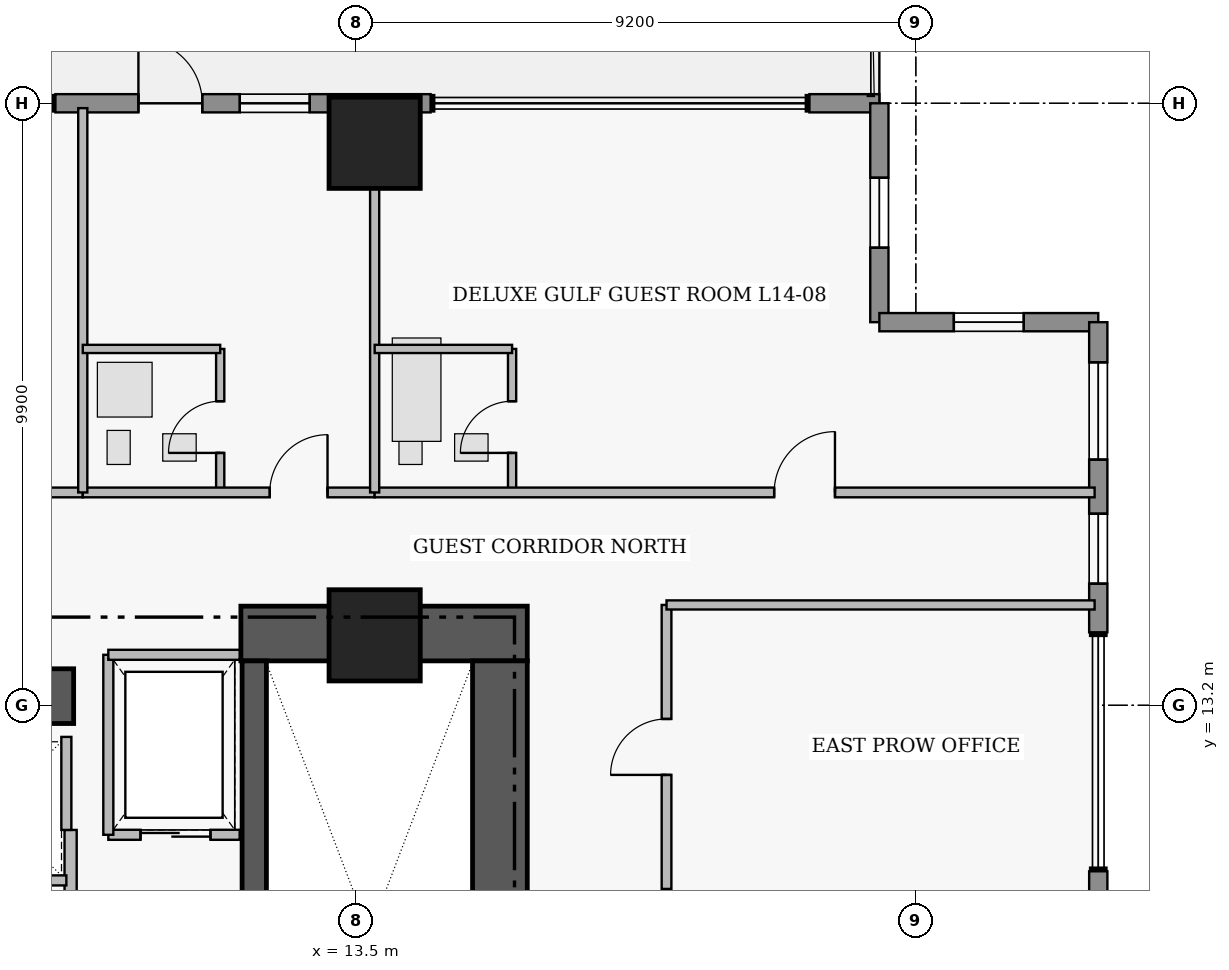
"""IFC4 building model, lengths in metres.
Left out: names, types, materials, properties, quantities, classifications, styles, units other than length and angle.
Written with IfcOpenShell. Run it as: python <this file> out.ifc"""

import sys

from ifc_helpers import new_model, si_unit, direction, frame, frame_2d, origin, origin_2d, place, context, subcontext, project, spatial, rectangle, extrude, element, fill, save


model = new_model("IFC4")
c1 = context("Model", 3, precision=1e-05, world=origin(), true_north=direction((0.0, 1.0)))
c2 = subcontext(c1, "Body", "Model", "MODEL_VIEW")
j1 = project(units=[si_unit("LENGTHUNIT", "METRE"), si_unit("PLANEANGLEUNIT", "RADIAN")], contexts=[c1])
p1 = place(None, origin())
s1 = spatial("IfcSite", under=j1, at=p1, CompositionType="ELEMENT")
p2 = place(p1, origin())
s2 = spatial("IfcBuilding", under=s1, at=p2, CompositionType="ELEMENT")
p3 = place(p2, frame((0.0, 0.0, 60.45)))
s3 = spatial("IfcBuildingStorey", under=s2, at=p3, CompositionType="ELEMENT", Elevation=60.45)
p4 = place(p3, frame((11.6, 14.38, 0.0), z_axis=(0.0, 0.0, 1.0), x_axis=(1.0, 0.0, 0.0)))
e1 = element("IfcWall", 1, at=p4, inside=s3, PredefinedType="SHEAR", context=c2, shape_type="SweptSolid", body=[
    extrude(rectangle(XDim=4.71, YDim=0.9, at=frame_2d((2.355, 0.0))), origin(), (0.0, 0.0, 1.0), 3.46),
])
p5 = place(p3, frame((15.86, 4.97, 0.0), z_axis=(0.0, 0.0, 1.0), x_axis=(0.0, 1.0, 0.0)))
e2 = element("IfcWall", 2, at=p5, inside=s3, PredefinedType="SHEAR", context=c2, shape_type="SweptSolid", body=[
    extrude(rectangle(XDim=8.96, YDim=0.9, at=frame_2d((4.48, 0.0))), origin(), (0.0, 0.0, 1.0), 3.46),
])
p6 = place(p3, frame((1.25, 13.35, 0.0), z_axis=(0.0, 0.0, 1.0), x_axis=(1.0, 0.0, 0.0)))
e3 = element("IfcWall", 3, at=p6, inside=s3, PredefinedType="SHEAR", context=c2, shape_type="SweptSolid", body=[
    extrude(rectangle(XDim=7.6, YDim=0.9, at=frame_2d((3.8, 0.0))), origin(), (0.0, 0.0, 1.0), 3.43),
])
p7 = place(p3, frame((11.82, 13.93, 0.0), z_axis=(0.0, 0.0, 1.0), x_axis=(0.0, -1.0, 0.0)))
e4 = element("IfcWall", 4, at=p7, inside=s3, PredefinedType="SHEAR", context=c2, shape_type="SweptSolid", body=[
    extrude(rectangle(XDim=8.96, YDim=0.4, at=frame_2d((4.48, 0.0))), origin(), (0.0, 0.0, 1.0), 3.46),
])
p8 = place(p7, frame((7.53, 0.0, 0.0)))
e5 = element("IfcOpeningElement", 5, at=p8, cuts=e4, PredefinedType="OPENING", context=c2, shape_type="SweptSolid", body=[
    extrude(rectangle(XDim=1.12, YDim=2.22, at=frame_2d((0.56, 1.11))), frame((0.0, 0.21, 0.0), z_axis=(0.0, -1.0, 0.0), x_axis=(1.0, 0.0, 0.0)), (0.0, 0.0, 1.0), 0.42),
])
for number, where, z_axis, x_axis in (
    (6, (13.8, 14.35, 0.0), (0.0, 0.0, 1.0), (1.0, 0.0, 0.0)),
    (7, (13.8, 22.45, 0.0), (0.0, 0.0, 1.0), (1.0, 0.0, 0.0)),
):
    element("IfcColumn", number, at=place(p3, frame(where, z_axis=z_axis, x_axis=x_axis)), inside=s3, PredefinedType="COLUMN", context=c2, shape_type="SweptSolid", body=[
        extrude(rectangle(XDim=1.5, YDim=1.5, at=origin_2d()), origin(), (0.0, 0.0, 1.0), 3.65),
    ])
p9 = place(p3, frame((8.55, 23.1, 0.0), z_axis=(0.0, 0.0, 1.0), x_axis=(1.0, 0.0, 0.0)))
e8 = element("IfcWall", 8, at=p9, inside=s3, PredefinedType="STANDARD", context=c2, shape_type="SweptSolid", body=[
    extrude(rectangle(XDim=6.17, YDim=0.3, at=frame_2d((3.085, 0.0))), origin(), (0.0, 0.0, 1.0), 3.43),
])
p10 = place(p9, frame((1.365, 0.0, 0.0)))
e9 = element("IfcOpeningElement", 9, at=p10, cuts=e8, PredefinedType="OPENING", context=c2, shape_type="SweptSolid", body=[
    extrude(rectangle(XDim=1.05, YDim=2.2, at=frame_2d((0.525, 1.1))), frame((0.0, 0.16, 0.0), z_axis=(0.0, -1.0, 0.0), x_axis=(1.0, 0.0, 0.0)), (0.0, 0.0, 1.0), 0.32),
])
p11 = place(p9, frame((3.032, 0.0, 0.95)))
e10 = element("IfcOpeningElement", 10, at=p11, cuts=e8, PredefinedType="OPENING", context=c2, shape_type="SweptSolid", body=[
    extrude(rectangle(XDim=1.15, YDim=1.55, at=frame_2d((0.575, 0.775))), frame((0.0, 0.16, 0.0), z_axis=(0.0, -1.0, 0.0), x_axis=(1.0, 0.0, 0.0)), (0.0, 0.0, 1.0), 0.32),
])
p12 = place(p3, frame((20.95, 23.1, 0.0), z_axis=(0.0, 0.0, 1.0), x_axis=(1.0, 0.0, 0.0)))
e11 = element("IfcWall", 11, at=p12, inside=s3, PredefinedType="STANDARD", context=c2, shape_type="SweptSolid", body=[
    extrude(rectangle(XDim=1.15, YDim=0.3, at=frame_2d((0.575, 0.0))), origin(), (0.0, 0.0, 1.0), 3.43),
])
p13 = place(p3, frame((22.1, 23.1, 0.0), z_axis=(0.0, 0.0, 1.0), x_axis=(0.0, -1.0, 0.0)))
e12 = element("IfcWall", 12, at=p13, inside=s3, PredefinedType="STANDARD", context=c2, shape_type="SweptSolid", body=[
    extrude(rectangle(XDim=3.6, YDim=0.3, at=frame_2d((1.8, 0.0))), origin(), (0.0, 0.0, 1.0), 3.43),
])
p14 = place(p13, frame((1.225, 0.0, 1.25)))
e13 = element("IfcOpeningElement", 13, at=p14, cuts=e12, PredefinedType="OPENING", context=c2, shape_type="SweptSolid", body=[
    extrude(rectangle(XDim=1.15, YDim=1.55, at=frame_2d((0.575, 0.775))), frame((0.0, 0.16, 0.0), z_axis=(0.0, -1.0, 0.0), x_axis=(1.0, 0.0, 0.0)), (0.0, 0.0, 1.0), 0.32),
])
p15 = place(p3, frame((22.1, 19.5, 0.0), z_axis=(0.0, 0.0, 1.0), x_axis=(1.0, 0.0, 0.0)))
e14 = element("IfcWall", 14, at=p15, inside=s3, PredefinedType="STANDARD", context=c2, shape_type="SweptSolid", body=[
    extrude(rectangle(XDim=3.6, YDim=0.3, at=frame_2d((1.8, 0.0))), origin(), (0.0, 0.0, 1.0), 3.43),
])
p16 = place(p15, frame((1.225, 0.0, 1.25)))
e15 = element("IfcOpeningElement", 15, at=p16, cuts=e14, PredefinedType="OPENING", context=c2, shape_type="SweptSolid", body=[
    extrude(rectangle(XDim=1.15, YDim=1.55, at=frame_2d((0.575, 0.775))), frame((0.0, 0.16, 0.0), z_axis=(0.0, -1.0, 0.0), x_axis=(1.0, 0.0, 0.0)), (0.0, 0.0, 1.0), 0.32),
])
p17 = place(p3, frame((25.7, 19.5, 0.0), z_axis=(0.0, 0.0, 1.0), x_axis=(0.0, -1.0, 0.0)))
e16 = element("IfcWall", 16, at=p17, inside=s3, PredefinedType="STANDARD", context=c2, shape_type="SweptSolid", body=[
    extrude(rectangle(XDim=5.1, YDim=0.3, at=frame_2d((2.55, 0.0))), origin(), (0.0, 0.0, 1.0), 3.43),
])
p18 = place(p17, frame((0.66, 0.0, 0.85)))
e17 = element("IfcOpeningElement", 17, at=p18, cuts=e16, PredefinedType="OPENING", context=c2, shape_type="SweptSolid", body=[
    extrude(rectangle(XDim=1.6, YDim=1.8, at=frame_2d((0.8, 0.9))), frame((0.0, 0.16, 0.0), z_axis=(0.0, -1.0, 0.0), x_axis=(1.0, 0.0, 0.0)), (0.0, 0.0, 1.0), 0.32),
])
p19 = place(p17, frame((3.15, 0.0, 0.95)))
e18 = element("IfcOpeningElement", 18, at=p19, cuts=e16, PredefinedType="OPENING", context=c2, shape_type="SweptSolid", body=[
    extrude(rectangle(XDim=1.15, YDim=1.55, at=frame_2d((0.575, 0.775))), frame((0.0, 0.16, 0.0), z_axis=(0.0, -1.0, 0.0), x_axis=(1.0, 0.0, 0.0)), (0.0, 0.0, 1.0), 0.32),
])
p20 = place(p3, frame((25.7, 10.47, 0.0), z_axis=(0.0, 0.0, 1.0), x_axis=(0.0, -1.0, 0.0)))
e19 = element("IfcWall", 19, at=p20, inside=s3, PredefinedType="STANDARD", context=c2, shape_type="SweptSolid", body=[
    extrude(rectangle(XDim=0.9, YDim=0.3, at=frame_2d((0.45, 0.0))), origin(), (0.0, 0.0, 1.0), 3.43),
])
p21 = place(p3, frame((8.8, 11.15, 0.0), z_axis=(0.0, 0.0, 1.0), x_axis=(0.0, -1.0, 0.0)))
e20 = element("IfcWall", 20, at=p21, inside=s3, PredefinedType="PARTITIONING", context=c2, shape_type="SweptSolid", body=[
    extrude(rectangle(XDim=6.1, YDim=0.2, at=frame_2d((3.05, 0.0))), origin(), (0.0, 0.0, 1.0), 3.43),
])
p22 = place(p21, frame((1.15, 0.0, 0.0)))
e21 = element("IfcOpeningElement", 21, at=p22, cuts=e20, PredefinedType="OPENING", context=c2, shape_type="SweptSolid", body=[
    extrude(rectangle(XDim=1.1, YDim=2.2, at=frame_2d((0.55, 1.1))), frame((0.0, 0.11, 0.0), z_axis=(0.0, -1.0, 0.0), x_axis=(1.0, 0.0, 0.0)), (0.0, 0.0, 1.0), 0.22),
])
p23 = place(p21, frame((4.75, 0.0, 0.0)))
e22 = element("IfcOpeningElement", 22, at=p23, cuts=e20, PredefinedType="OPENING", context=c2, shape_type="SweptSolid", body=[
    extrude(rectangle(XDim=1.1, YDim=2.2, at=frame_2d((0.55, 1.1))), frame((0.0, 0.11, 0.0), z_axis=(0.0, -1.0, 0.0), x_axis=(1.0, 0.0, 0.0)), (0.0, 0.0, 1.0), 0.22),
])
p24 = place(p3, frame((9.42, 11.07, 0.0), z_axis=(0.0, 0.0, 1.0), x_axis=(1.0, 0.0, 0.0)))
e23 = element("IfcWall", 23, at=p24, inside=s3, PredefinedType="PARTITIONING", context=c2, shape_type="SweptSolid", body=[
    extrude(rectangle(XDim=2.16, YDim=0.165, at=frame_2d((1.08, 0.0))), origin(), (0.0, 0.0, 1.0), 3.43),
])
p25 = place(p24, frame((0.53, 0.0, 0.0)))
e24 = element("IfcOpeningElement", 24, at=p25, cuts=e23, PredefinedType="OPENING", context=c2, shape_type="SweptSolid", body=[
    extrude(rectangle(XDim=1.15, YDim=2.25, at=frame_2d((0.575, 1.125))), frame((0.0, 0.093, 0.0), z_axis=(0.0, -1.0, 0.0), x_axis=(1.0, 0.0, 0.0)), (0.0, 0.0, 1.0), 0.185),
])
p26 = place(p3, frame((4.6, 16.7, 0.0), z_axis=(0.0, 0.0, 1.0), x_axis=(1.0, 0.0, 0.0)))
e25 = element("IfcWall", 25, at=p26, inside=s3, PredefinedType="PARTITIONING", context=c2, shape_type="SweptSolid", body=[
    extrude(rectangle(XDim=4.4, YDim=0.16, at=frame_2d((2.2, 0.0))), origin(), (0.0, 0.0, 1.0), 2.973),
])
p27 = place(p26, frame((2.875, 0.0, 0.0)))
e26 = element("IfcOpeningElement", 26, at=p27, cuts=e25, PredefinedType="OPENING", context=c2, shape_type="SweptSolid", body=[
    extrude(rectangle(XDim=0.95, YDim=2.15, at=frame_2d((0.475, 1.075))), frame((0.0, 0.09, 0.0), z_axis=(0.0, -1.0, 0.0), x_axis=(1.0, 0.0, 0.0)), (0.0, 0.0, 1.0), 0.18),
])
p28 = place(p3, frame((11.26, 16.7, 0.0), z_axis=(0.0, 0.0, 1.0), x_axis=(0.0, 1.0, 0.0)))
e27 = element("IfcWall", 27, at=p28, inside=s3, PredefinedType="PLUMBINGWALL", context=c2, shape_type="SweptSolid", body=[
    extrude(rectangle(XDim=2.36, YDim=0.135, at=frame_2d((1.18, 0.0))), origin(), (0.0, 0.0, 1.0), 3.43),
])
p29 = place(p28, frame((0.65, 0.0, 0.0)))
e28 = element("IfcOpeningElement", 28, at=p29, cuts=e27, PredefinedType="OPENING", context=c2, shape_type="SweptSolid", body=[
    extrude(rectangle(XDim=0.85, YDim=2.1, at=frame_2d((0.425, 1.05))), frame((0.0, 0.077, 0.0), z_axis=(0.0, -1.0, 0.0), x_axis=(1.0, 0.0, 0.0)), (0.0, 0.0, 1.0), 0.155),
])
p30 = place(p3, frame((9.0, 16.7, 0.0), z_axis=(0.0, 0.0, 1.0), x_axis=(1.0, 0.0, 0.0)))
e29 = element("IfcWall", 29, at=p30, inside=s3, PredefinedType="PARTITIONING", context=c2, shape_type="SweptSolid", body=[
    extrude(rectangle(XDim=4.8, YDim=0.16, at=frame_2d((2.4, 0.0))), origin(), (0.0, 0.0, 1.0), 2.973),
])
p31 = place(p30, frame((3.075, 0.0, 0.0)))
e30 = element("IfcOpeningElement", 30, at=p31, cuts=e29, PredefinedType="OPENING", context=c2, shape_type="SweptSolid", body=[
    extrude(rectangle(XDim=0.95, YDim=2.15, at=frame_2d((0.475, 1.075))), frame((0.0, 0.09, 0.0), z_axis=(0.0, -1.0, 0.0), x_axis=(1.0, 0.0, 0.0)), (0.0, 0.0, 1.0), 0.18),
])
p32 = place(p3, frame((16.06, 16.7, 0.0), z_axis=(0.0, 0.0, 1.0), x_axis=(0.0, 1.0, 0.0)))
e31 = element("IfcWall", 31, at=p32, inside=s3, PredefinedType="PLUMBINGWALL", context=c2, shape_type="SweptSolid", body=[
    extrude(rectangle(XDim=2.36, YDim=0.135, at=frame_2d((1.18, 0.0))), origin(), (0.0, 0.0, 1.0), 3.43),
])
p33 = place(p32, frame((0.65, 0.0, 0.0)))
e32 = element("IfcOpeningElement", 32, at=p33, cuts=e31, PredefinedType="OPENING", context=c2, shape_type="SweptSolid", body=[
    extrude(rectangle(XDim=0.85, YDim=2.1, at=frame_2d((0.425, 1.05))), frame((0.0, 0.077, 0.0), z_axis=(0.0, -1.0, 0.0), x_axis=(1.0, 0.0, 0.0)), (0.0, 0.0, 1.0), 0.155),
])
p34 = place(p3, frame((13.8, 16.7, 0.0), z_axis=(0.0, 0.0, 1.0), x_axis=(1.0, 0.0, 0.0)))
e33 = element("IfcWall", 33, at=p34, inside=s3, PredefinedType="PARTITIONING", context=c2, shape_type="SweptSolid", body=[
    extrude(rectangle(XDim=11.84, YDim=0.16, at=frame_2d((5.92, 0.0))), origin(), (0.0, 0.0, 1.0), 3.43),
])
p35 = place(p34, frame((6.57, 0.0, 0.0)))
e34 = element("IfcOpeningElement", 34, at=p35, cuts=e33, PredefinedType="OPENING", context=c2, shape_type="SweptSolid", body=[
    extrude(rectangle(XDim=1.0, YDim=2.15, at=frame_2d((0.5, 1.075))), frame((0.0, 0.09, 0.0), z_axis=(0.0, -1.0, 0.0), x_axis=(1.0, 0.0, 0.0)), (0.0, 0.0, 1.0), 0.18),
])
p36 = place(p3, frame((18.6, 10.18, 0.0), z_axis=(0.0, 0.0, 1.0), x_axis=(0.0, 1.0, 0.0)))
e35 = element("IfcWall", 35, at=p36, inside=s3, PredefinedType="PARTITIONING", context=c2, shape_type="SweptSolid", body=[
    extrude(rectangle(XDim=4.67, YDim=0.16, at=frame_2d((2.335, 0.0))), origin(), (0.0, 0.0, 1.0), 3.43),
])
p37 = place(p36, frame((1.875, 0.0, 0.0)))
e36 = element("IfcOpeningElement", 36, at=p37, cuts=e35, PredefinedType="OPENING", context=c2, shape_type="SweptSolid", body=[
    extrude(rectangle(XDim=0.92, YDim=2.12, at=frame_2d((0.46, 1.06))), frame((0.0, 0.09, 0.0), z_axis=(0.0, -1.0, 0.0), x_axis=(1.0, 0.0, 0.0)), (0.0, 0.0, 1.0), 0.18),
])
p38 = place(p3, frame((9.42, 11.07, 0.0), z_axis=(0.0, 0.0, 1.0), x_axis=(0.0, 1.0, 0.0)))
e37 = element("IfcWall", 37, at=p38, inside=s3, PredefinedType="PARTITIONING", context=c2, shape_type="SweptSolid", body=[
    extrude(rectangle(XDim=2.96, YDim=0.165, at=frame_2d((1.48, 0.0))), origin(), (0.0, 0.0, 1.0), 3.43),
])
p39 = place(p3, frame((9.42, 14.03, 0.0), z_axis=(0.0, 0.0, 1.0), x_axis=(1.0, 0.0, 0.0)))
e38 = element("IfcWall", 38, at=p39, inside=s3, PredefinedType="PARTITIONING", context=c2, shape_type="SweptSolid", body=[
    extrude(rectangle(XDim=2.16, YDim=0.165, at=frame_2d((1.08, 0.0))), origin(), (0.0, 0.0, 1.0), 3.43),
])
p40 = place(p3, frame((6.25, 10.32, 0.0), z_axis=(0.0, 0.0, 1.0), x_axis=(1.0, 0.0, 0.0)))
e39 = element("IfcWall", 39, at=p40, inside=s3, PredefinedType="PARTITIONING", context=c2, shape_type="SweptSolid", body=[
    extrude(rectangle(XDim=2.48, YDim=0.165, at=frame_2d((1.24, 0.0))), origin(), (0.0, 0.0, 1.0), 3.43),
])
p41 = place(p3, frame((8.73, 11.15, 0.0), z_axis=(0.0, 0.0, 1.0), x_axis=(0.0, 1.0, 0.0)))
e40 = element("IfcWall", 40, at=p41, inside=s3, PredefinedType="PARTITIONING", context=c2, shape_type="SweptSolid", body=[
    extrude(rectangle(XDim=1.53, YDim=0.165, at=frame_2d((0.765, 0.0))), origin(), (0.0, 0.0, 1.0), 3.43),
])
p42 = place(p3, frame((9.0, 16.7, 0.0), z_axis=(0.0, 0.0, 1.0), x_axis=(0.0, 1.0, 0.0)))
e41 = element("IfcWall", 41, at=p42, inside=s3, PredefinedType="PARTITIONING", context=c2, shape_type="SweptSolid", body=[
    extrude(rectangle(XDim=6.32, YDim=0.15, at=frame_2d((3.16, 0.0))), origin(), (0.0, 0.0, 1.0), 3.43),
])
p43 = place(p3, frame((9.0, 19.06, 0.0), z_axis=(0.0, 0.0, 1.0), x_axis=(1.0, 0.0, 0.0)))
e42 = element("IfcWall", 42, at=p43, inside=s3, PredefinedType="PLUMBINGWALL", context=c2, shape_type="SweptSolid", body=[
    extrude(rectangle(XDim=2.26, YDim=0.135, at=frame_2d((1.13, 0.0))), origin(), (0.0, 0.0, 1.0), 2.973),
])
p44 = place(p3, frame((13.8, 16.7, 0.0), z_axis=(0.0, 0.0, 1.0), x_axis=(0.0, 1.0, 0.0)))
e43 = element("IfcWall", 43, at=p44, inside=s3, PredefinedType="PARTITIONING", context=c2, shape_type="SweptSolid", body=[
    extrude(rectangle(XDim=6.32, YDim=0.15, at=frame_2d((3.16, 0.0))), origin(), (0.0, 0.0, 1.0), 2.668),
])
p45 = place(p3, frame((13.8, 19.06, 0.0), z_axis=(0.0, 0.0, 1.0), x_axis=(1.0, 0.0, 0.0)))
e44 = element("IfcWall", 44, at=p45, inside=s3, PredefinedType="PLUMBINGWALL", context=c2, shape_type="SweptSolid", body=[
    extrude(rectangle(XDim=2.26, YDim=0.135, at=frame_2d((1.13, 0.0))), origin(), (0.0, 0.0, 1.0), 3.43),
])
p46 = place(p3, frame((18.6, 14.85, 0.0), z_axis=(0.0, 0.0, 1.0), x_axis=(1.0, 0.0, 0.0)))
e45 = element("IfcWall", 45, at=p46, inside=s3, PredefinedType="PARTITIONING", context=c2, shape_type="SweptSolid", body=[
    extrude(rectangle(XDim=7.04, YDim=0.15, at=frame_2d((3.52, 0.0))), origin(), (0.0, 0.0, 1.0), 3.43),
])
p47 = place(p10, origin())
e46 = element("IfcDoor", 46, at=p47, inside=s3, OperationType="SINGLE_SWING_LEFT", PredefinedType="DOOR", context=c2, shape_type="SweptSolid", body=[
    extrude(rectangle(XDim=1.05, YDim=2.2, at=frame_2d((0.525, 1.1))), frame((0.0, 0.025, 0.0), z_axis=(0.0, -1.0, 0.0), x_axis=(1.0, 0.0, 0.0)), (0.0, 0.0, 1.0), 0.05),
])
fill(e9, e46)
p48 = place(p11, origin())
e47 = element("IfcWindow", 47, at=p48, inside=s3, PartitioningType="SINGLE_PANEL", PredefinedType="WINDOW", context=c2, shape_type="SweptSolid", body=[
    extrude(rectangle(XDim=1.15, YDim=1.55, at=frame_2d((0.575, 0.775))), frame((0.0, 0.03, 0.0), z_axis=(0.0, -1.0, 0.0), x_axis=(1.0, 0.0, 0.0)), (0.0, 0.0, 1.0), 0.06),
])
fill(e10, e47)
p49 = place(p14, origin())
e48 = element("IfcWindow", 48, at=p49, inside=s3, PartitioningType="SINGLE_PANEL", PredefinedType="WINDOW", context=c2, shape_type="SweptSolid", body=[
    extrude(rectangle(XDim=1.15, YDim=1.55, at=frame_2d((0.575, 0.775))), frame((0.0, 0.03, 0.0), z_axis=(0.0, -1.0, 0.0), x_axis=(1.0, 0.0, 0.0)), (0.0, 0.0, 1.0), 0.06),
])
fill(e13, e48)
p50 = place(p16, origin())
e49 = element("IfcWindow", 49, at=p50, inside=s3, PartitioningType="SINGLE_PANEL", PredefinedType="WINDOW", context=c2, shape_type="SweptSolid", body=[
    extrude(rectangle(XDim=1.15, YDim=1.55, at=frame_2d((0.575, 0.775))), frame((0.0, 0.03, 0.0), z_axis=(0.0, -1.0, 0.0), x_axis=(1.0, 0.0, 0.0)), (0.0, 0.0, 1.0), 0.06),
])
fill(e15, e49)
p51 = place(p18, origin())
e50 = element("IfcWindow", 50, at=p51, inside=s3, PartitioningType="SINGLE_PANEL", PredefinedType="WINDOW", context=c2, shape_type="SweptSolid", body=[
    extrude(rectangle(XDim=1.6, YDim=1.8, at=frame_2d((0.8, 0.9))), frame((0.0, 0.03, 0.0), z_axis=(0.0, -1.0, 0.0), x_axis=(1.0, 0.0, 0.0)), (0.0, 0.0, 1.0), 0.06),
])
fill(e17, e50)
p52 = place(p19, origin())
e51 = element("IfcWindow", 51, at=p52, inside=s3, PartitioningType="SINGLE_PANEL", PredefinedType="WINDOW", context=c2, shape_type="SweptSolid", body=[
    extrude(rectangle(XDim=1.15, YDim=1.55, at=frame_2d((0.575, 0.775))), frame((0.0, 0.03, 0.0), z_axis=(0.0, -1.0, 0.0), x_axis=(1.0, 0.0, 0.0)), (0.0, 0.0, 1.0), 0.06),
])
fill(e18, e51)
p53 = place(p25, origin())
e52 = element("IfcDoor", 52, at=p53, inside=s3, OperationType="SLIDING_TO_LEFT", PredefinedType="DOOR", context=c2, shape_type="SweptSolid", body=[
    extrude(rectangle(XDim=1.15, YDim=2.25, at=frame_2d((0.575, 1.125))), frame((0.0, 0.025, 0.0), z_axis=(0.0, -1.0, 0.0), x_axis=(1.0, 0.0, 0.0)), (0.0, 0.0, 1.0), 0.05),
])
fill(e24, e52)
p54 = place(p29, origin())
e53 = element("IfcDoor", 53, at=p54, inside=s3, OperationType="SINGLE_SWING_LEFT", PredefinedType="DOOR", context=c2, shape_type="SweptSolid", body=[
    extrude(rectangle(XDim=0.85, YDim=2.1, at=frame_2d((0.425, 1.05))), frame((0.0, 0.025, 0.0), z_axis=(0.0, -1.0, 0.0), x_axis=(1.0, 0.0, 0.0)), (0.0, 0.0, 1.0), 0.05),
])
fill(e28, e53)
p55 = place(p31, origin())
e54 = element("IfcDoor", 54, at=p55, inside=s3, OperationType="SINGLE_SWING_RIGHT", PredefinedType="DOOR", context=c2, shape_type="SweptSolid", body=[
    extrude(rectangle(XDim=0.95, YDim=2.15, at=frame_2d((0.475, 1.075))), frame((0.0, 0.025, 0.0), z_axis=(0.0, -1.0, 0.0), x_axis=(1.0, 0.0, 0.0)), (0.0, 0.0, 1.0), 0.05),
])
fill(e30, e54)
p56 = place(p33, origin())
e55 = element("IfcDoor", 55, at=p56, inside=s3, OperationType="SINGLE_SWING_LEFT", PredefinedType="DOOR", context=c2, shape_type="SweptSolid", body=[
    extrude(rectangle(XDim=0.85, YDim=2.1, at=frame_2d((0.425, 1.05))), frame((0.0, 0.025, 0.0), z_axis=(0.0, -1.0, 0.0), x_axis=(1.0, 0.0, 0.0)), (0.0, 0.0, 1.0), 0.05),
])
fill(e32, e55)
p57 = place(p35, origin())
e56 = element("IfcDoor", 56, at=p57, inside=s3, OperationType="SINGLE_SWING_RIGHT", PredefinedType="DOOR", context=c2, shape_type="SweptSolid", body=[
    extrude(rectangle(XDim=1.0, YDim=2.15, at=frame_2d((0.5, 1.075))), frame((0.0, 0.025, 0.0), z_axis=(0.0, -1.0, 0.0), x_axis=(1.0, 0.0, 0.0)), (0.0, 0.0, 1.0), 0.05),
])
fill(e34, e56)
p58 = place(p37, origin())
e57 = element("IfcDoor", 57, at=p58, inside=s3, OperationType="SINGLE_SWING_LEFT", PredefinedType="DOOR", context=c2, shape_type="SweptSolid", body=[
    extrude(rectangle(XDim=0.92, YDim=2.12, at=frame_2d((0.46, 1.06))), frame((0.0, 0.025, 0.0), z_axis=(0.0, -1.0, 0.0), x_axis=(1.0, 0.0, 0.0)), (0.0, 0.0, 1.0), 0.05),
])
fill(e36, e57)
save(model, sys.argv[1])
